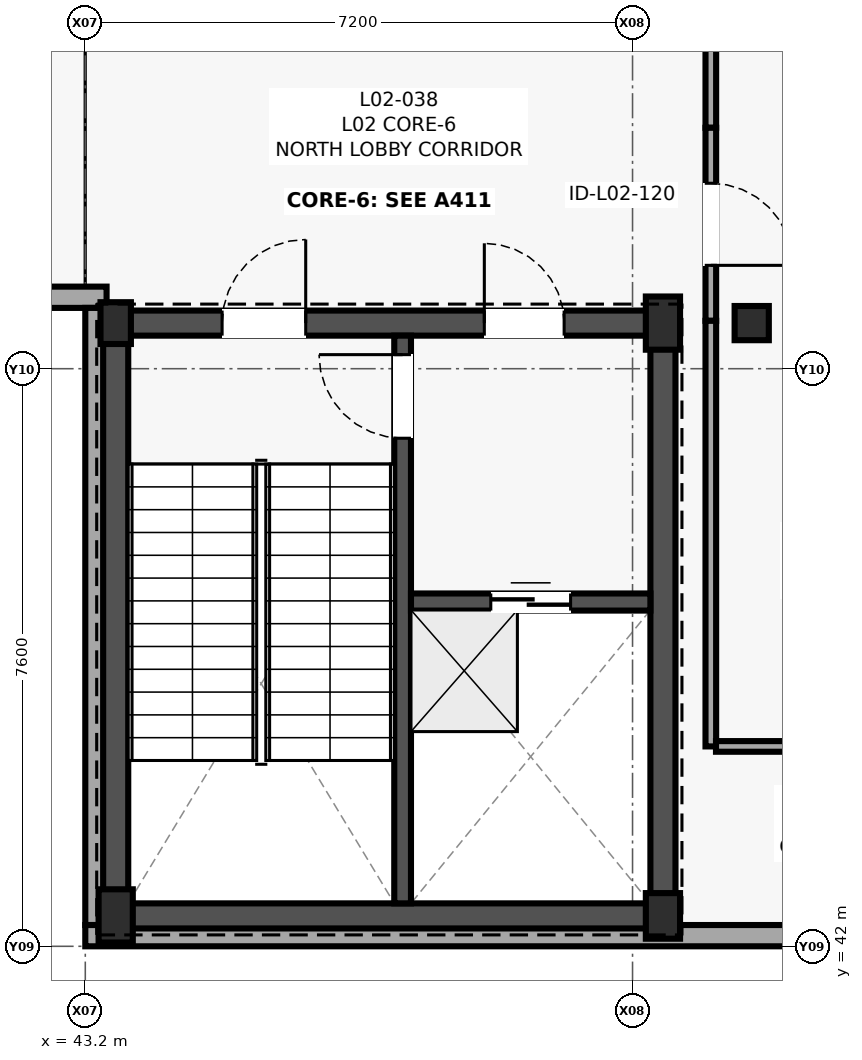
"""IFC4 building model, lengths in metres.
Left out: names, types, materials, properties, quantities, classifications, styles, units other than length and angle.
Written with IfcOpenShell. Run it as: python <this file> out.ifc"""

import sys

from ifc_helpers import new_model, si_unit, direction, frame, frame_2d, origin, origin_2d, place, context, subcontext, project, spatial, rectangle, circle, extrude, element, fill, save


model = new_model("IFC4")
c1 = context("Model", 3, precision=1e-05, world=origin(), true_north=direction((0.0, 1.0)))
c2 = subcontext(c1, "Body", "Model", "MODEL_VIEW")
j1 = project(units=[si_unit("LENGTHUNIT", "METRE"), si_unit("PLANEANGLEUNIT", "RADIAN")], contexts=[c1])
p1 = place(None, origin())
s1 = spatial("IfcSite", under=j1, at=p1, CompositionType="ELEMENT")
p2 = place(p1, origin())
s2 = spatial("IfcBuilding", under=s1, at=p2, CompositionType="ELEMENT")
p3 = place(p2, frame((0.0, 0.0, 8.2)))
s3 = spatial("IfcBuildingStorey", under=s2, at=p3, CompositionType="ELEMENT", Elevation=8.2)
p4 = place(p3, frame((43.6, 42.4, 0.0), z_axis=(0.0, 0.0, 1.0), x_axis=(1.0, 0.0, 0.0)))
e1 = element("IfcColumn", 1, at=p4, inside=s3, PredefinedType="COLUMN", context=c2, shape_type="SweptSolid", body=[
    extrude(rectangle(XDim=0.45, YDim=0.7, at=origin_2d()), origin(), (0.0, 0.0, 1.0), 4.0),
])
p5 = place(p3, frame((43.6, 50.2, 0.0), z_axis=(0.0, 0.0, 1.0), x_axis=(1.0, 0.0, 0.0)))
e2 = element("IfcColumn", 2, at=p5, inside=s3, PredefinedType="COLUMN", context=c2, shape_type="SweptSolid", body=[
    extrude(rectangle(XDim=0.4, YDim=0.55, at=origin_2d()), origin(), (0.0, 0.0, 1.0), 4.0),
])
p6 = place(p3, frame((50.8, 42.4, 0.0), z_axis=(0.0, 0.0, 1.0), x_axis=(1.0, 0.0, 0.0)))
e3 = element("IfcColumn", 3, at=p6, inside=s3, PredefinedType="COLUMN", context=c2, shape_type="SweptSolid", body=[
    extrude(rectangle(XDim=0.45, YDim=0.6, at=origin_2d()), origin(), (0.0, 0.0, 1.0), 4.0),
])
p7 = place(p3, frame((50.8, 50.2, 0.0), z_axis=(0.0, 0.0, 1.0), x_axis=(1.0, 0.0, 0.0)))
e4 = element("IfcColumn", 4, at=p7, inside=s3, PredefinedType="COLUMN", context=c2, shape_type="SweptSolid", body=[
    extrude(rectangle(XDim=0.45, YDim=0.7, at=origin_2d()), origin(), (0.0, 0.0, 1.0), 4.0),
])
p8 = place(p3, frame((51.968, 50.2, 0.0), z_axis=(0.0, 0.0, 1.0), x_axis=(1.0, 0.0, 0.0)))
e5 = element("IfcColumn", 5, at=p8, inside=s3, PredefinedType="COLUMN", context=c2, shape_type="SweptSolid", body=[
    extrude(circle(Radius=0.225, at=origin_2d()), origin(), (0.0, 0.0, 1.0), 4.0),
])
p9 = place(p3, frame((35.6, 50.54, 0.0), z_axis=(0.0, 0.0, 1.0), x_axis=(1.0, 0.0, 0.0)))
e6 = element("IfcWall", 6, at=p9, inside=s3, PredefinedType="SOLIDWALL", context=c2, shape_type="SweptSolid", body=[
    extrude(rectangle(XDim=7.88, YDim=0.28, at=frame_2d((3.94, 0.0))), origin(), (0.0, 0.0, 1.0), 3.78),
])
p10 = place(p9, frame((0.945, 0.0, 1.05)))
e7 = element("IfcOpeningElement", 7, at=p10, cuts=e6, PredefinedType="OPENING", context=c2, shape_type="SweptSolid", body=[
    extrude(rectangle(XDim=2.05, YDim=1.55, at=frame_2d((1.025, 0.775))), frame((0.0, 0.15, 0.0), z_axis=(0.0, -1.0, 0.0), x_axis=(1.0, 0.0, 0.0)), (0.0, 0.0, 1.0), 0.3),
])
p11 = place(p9, frame((4.76, 0.0, 1.05)))
e8 = element("IfcOpeningElement", 8, at=p11, cuts=e6, PredefinedType="OPENING", context=c2, shape_type="SweptSolid", body=[
    extrude(rectangle(XDim=2.3, YDim=1.45, at=frame_2d((1.15, 0.725))), frame((0.0, 0.15, 0.0), z_axis=(0.0, -1.0, 0.0), x_axis=(1.0, 0.0, 0.0)), (0.0, 0.0, 1.0), 0.3),
])
p12 = place(p3, frame((43.34, 50.4, 0.0), z_axis=(0.0, 0.0, 1.0), x_axis=(0.0, -1.0, 0.0)))
e9 = element("IfcWall", 9, at=p12, inside=s3, PredefinedType="SOLIDWALL", context=c2, shape_type="SweptSolid", body=[
    extrude(rectangle(XDim=8.12, YDim=0.28, at=frame_2d((4.06, 0.0))), origin(), (0.0, 0.0, 1.0), 3.78),
])
p13 = place(p3, frame((43.2, 42.14, 0.0), z_axis=(0.0, 0.0, 1.0), x_axis=(1.0, 0.0, 0.0)))
e10 = element("IfcWall", 10, at=p13, inside=s3, PredefinedType="SOLIDWALL", context=c2, shape_type="SweptSolid", body=[
    extrude(rectangle(XDim=12.093, YDim=0.28, at=frame_2d((6.046, 0.0))), origin(), (0.0, 0.0, 1.0), 3.78),
])
p14 = place(p13, frame((9.477, 0.0, 1.05)))
e11 = element("IfcOpeningElement", 11, at=p14, cuts=e10, PredefinedType="OPENING", context=c2, shape_type="SweptSolid", body=[
    extrude(rectangle(XDim=1.2, YDim=0.9, at=frame_2d((0.6, 0.45))), frame((0.0, 0.15, 0.0), z_axis=(0.0, -1.0, 0.0), x_axis=(1.0, 0.0, 0.0)), (0.0, 0.0, 1.0), 0.3),
])
p15 = place(p3, frame((43.435, 42.4, 0.0), z_axis=(0.0, 0.0, 1.0), x_axis=(1.0, 0.0, 0.0)))
e12 = element("IfcWall", 12, at=p15, inside=s3, PredefinedType="SHEAR", context=c2, shape_type="SweptSolid", body=[
    extrude(rectangle(XDim=7.53, YDim=0.33, at=frame_2d((3.765, 0.0))), origin(), (0.0, 0.0, 1.0), 3.78),
])
p16 = place(p3, frame((43.435, 50.2, 0.0), z_axis=(0.0, 0.0, 1.0), x_axis=(1.0, 0.0, 0.0)))
e13 = element("IfcWall", 13, at=p16, inside=s3, PredefinedType="SHEAR", context=c2, shape_type="SweptSolid", body=[
    extrude(rectangle(XDim=7.53, YDim=0.33, at=frame_2d((3.765, 0.0))), origin(), (0.0, 0.0, 1.0), 3.78),
])
p17 = place(p16, frame((5.015, 0.0, 0.0)))
e14 = element("IfcOpeningElement", 14, at=p17, cuts=e13, PredefinedType="OPENING", context=c2, shape_type="SweptSolid", body=[
    extrude(rectangle(XDim=1.05, YDim=2.15, at=frame_2d((0.525, 1.075))), frame((0.0, 0.175, 0.0), z_axis=(0.0, -1.0, 0.0), x_axis=(1.0, 0.0, 0.0)), (0.0, 0.0, 1.0), 0.35),
])
p18 = place(p16, frame((1.565, 0.0, 0.0)))
e15 = element("IfcOpeningElement", 15, at=p18, cuts=e13, PredefinedType="OPENING", context=c2, shape_type="SweptSolid", body=[
    extrude(rectangle(XDim=1.1, YDim=2.15, at=frame_2d((0.55, 1.075))), frame((0.0, 0.175, 0.0), z_axis=(0.0, -1.0, 0.0), x_axis=(1.0, 0.0, 0.0)), (0.0, 0.0, 1.0), 0.35),
])
for number, where, z_axis, x_axis in (
    (16, (43.6, 42.565, 0.0), (0.0, 0.0, 1.0), (0.0, 1.0, 0.0)),
    (17, (50.8, 42.565, 0.0), (0.0, 0.0, 1.0), (0.0, 1.0, 0.0)),
):
    element("IfcWall", number, at=place(p3, frame(where, z_axis=z_axis, x_axis=x_axis)), inside=s3, PredefinedType="SHEAR", context=c2, shape_type="SweptSolid", body=[
        extrude(rectangle(XDim=7.47, YDim=0.33, at=frame_2d((3.735, 0.0))), origin(), (0.0, 0.0, 1.0), 3.78),
    ])
p19 = place(p3, frame((47.375, 42.565, 0.0), z_axis=(0.0, 0.0, 1.0), x_axis=(0.0, 1.0, 0.0)))
e18 = element("IfcWall", 18, at=p19, inside=s3, PredefinedType="SHEAR", context=c2, shape_type="SweptSolid", body=[
    extrude(rectangle(XDim=7.47, YDim=0.22, at=frame_2d((3.735, 0.0))), origin(), (0.0, 0.0, 1.0), 3.78),
])
p20 = place(p19, frame((6.12, 0.0, 0.0)))
e19 = element("IfcOpeningElement", 19, at=p20, cuts=e18, PredefinedType="OPENING", context=c2, shape_type="SweptSolid", body=[
    extrude(rectangle(XDim=1.1, YDim=2.15, at=frame_2d((0.55, 1.075))), frame((0.0, 0.12, 0.0), z_axis=(0.0, -1.0, 0.0), x_axis=(1.0, 0.0, 0.0)), (0.0, 0.0, 1.0), 0.24),
])
p21 = place(p3, frame((47.485, 46.53, 0.0), z_axis=(0.0, 0.0, 1.0), x_axis=(1.0, 0.0, 0.0)))
e20 = element("IfcWall", 20, at=p21, inside=s3, PredefinedType="SHEAR", context=c2, shape_type="SweptSolid", body=[
    extrude(rectangle(XDim=3.15, YDim=0.225, at=frame_2d((1.575, 0.0))), origin(), (0.0, 0.0, 1.0), 3.78),
])
p22 = place(p21, frame((1.05, 0.0, 0.0)))
e21 = element("IfcOpeningElement", 21, at=p22, cuts=e20, PredefinedType="OPENING", context=c2, shape_type="SweptSolid", body=[
    extrude(rectangle(XDim=1.05, YDim=2.2, at=frame_2d((0.525, 1.1))), frame((0.0, 0.123, 0.0), z_axis=(0.0, -1.0, 0.0), x_axis=(1.0, 0.0, 0.0)), (0.0, 0.0, 1.0), 0.245),
])
p23 = place(p3, frame((51.43, 56.77, 0.0), z_axis=(0.0, 0.0, 1.0), x_axis=(0.0, -1.0, 0.0)))
e22 = element("IfcWall", 22, at=p23, inside=s3, PredefinedType="PARTITIONING", context=c2, shape_type="SweptSolid", body=[
    extrude(rectangle(XDim=4.0, YDim=0.14, at=frame_2d((2.0, 0.0))), origin(), (0.0, 0.0, 1.0), 3.775),
])
p24 = place(p3, frame((51.43, 52.77, 0.0), z_axis=(0.0, 0.0, 1.0), x_axis=(0.0, -1.0, 0.0)))
e23 = element("IfcWall", 23, at=p24, inside=s3, PredefinedType="PARTITIONING", context=c2, shape_type="SweptSolid", body=[
    extrude(rectangle(XDim=2.54, YDim=0.14, at=frame_2d((1.27, 0.0))), origin(), (0.0, 0.0, 1.0), 3.775),
])
p25 = place(p24, frame((0.73, 0.0, 0.0)))
e24 = element("IfcOpeningElement", 24, at=p25, cuts=e23, PredefinedType="OPENING", context=c2, shape_type="SweptSolid", body=[
    extrude(rectangle(XDim=1.08, YDim=2.16, at=frame_2d((0.54, 1.08))), frame((0.0, 0.08, 0.0), z_axis=(0.0, -1.0, 0.0), x_axis=(1.0, 0.0, 0.0)), (0.0, 0.0, 1.0), 0.16),
])
p26 = place(p3, frame((51.43, 50.23, 0.0), z_axis=(0.0, 0.0, 1.0), x_axis=(0.0, -1.0, 0.0)))
e25 = element("IfcWall", 25, at=p26, inside=s3, PredefinedType="PARTITIONING", context=c2, shape_type="SweptSolid", body=[
    extrude(rectangle(XDim=5.6, YDim=0.14, at=frame_2d((2.8, 0.0))), origin(), (0.0, 0.0, 1.0), 3.775),
])
p27 = place(p3, frame((51.498, 44.63, 0.0), z_axis=(0.0, 0.0, 1.0), x_axis=(1.0, 0.0, 0.0)))
e26 = element("IfcWall", 26, at=p27, inside=s3, PredefinedType="PARTITIONING", context=c2, shape_type="SweptSolid", body=[
    extrude(rectangle(XDim=11.872, YDim=0.14, at=frame_2d((5.936, 0.0))), origin(), (0.0, 0.0, 1.0), 3.775),
])
p28 = place(p22, origin())
e27 = element("IfcDoor", 27, at=p28, inside=s3, OperationType="SLIDING_TO_LEFT", PredefinedType="DOOR", context=c2, shape_type="SweptSolid", body=[
    extrude(rectangle(XDim=1.05, YDim=2.2, at=frame_2d((0.525, 1.1))), frame((0.0, 0.025, 0.0), z_axis=(0.0, -1.0, 0.0), x_axis=(1.0, 0.0, 0.0)), (0.0, 0.0, 1.0), 0.05),
])
fill(e21, e27)
p29 = place(p20, origin())
e28 = element("IfcDoor", 28, at=p29, inside=s3, OperationType="SINGLE_SWING_RIGHT", PredefinedType="DOOR", context=c2, shape_type="SweptSolid", body=[
    extrude(rectangle(XDim=1.1, YDim=2.15, at=frame_2d((0.55, 1.075))), frame((0.0, 0.025, 0.0), z_axis=(0.0, -1.0, 0.0), x_axis=(1.0, 0.0, 0.0)), (0.0, 0.0, 1.0), 0.05),
])
fill(e19, e28)
p30 = place(p17, origin())
e29 = element("IfcDoor", 29, at=p30, inside=s3, OperationType="SINGLE_SWING_LEFT", PredefinedType="DOOR", context=c2, shape_type="SweptSolid", body=[
    extrude(rectangle(XDim=1.05, YDim=2.15, at=frame_2d((0.525, 1.075))), frame((0.0, 0.025, 0.0), z_axis=(0.0, -1.0, 0.0), x_axis=(1.0, 0.0, 0.0)), (0.0, 0.0, 1.0), 0.05),
])
fill(e14, e29)
p31 = place(p18, origin())
e30 = element("IfcDoor", 30, at=p31, inside=s3, OperationType="SINGLE_SWING_RIGHT", PredefinedType="DOOR", context=c2, shape_type="SweptSolid", body=[
    extrude(rectangle(XDim=1.1, YDim=2.15, at=frame_2d((0.55, 1.075))), frame((0.0, 0.025, 0.0), z_axis=(0.0, -1.0, 0.0), x_axis=(1.0, 0.0, 0.0)), (0.0, 0.0, 1.0), 0.05),
])
fill(e15, e30)
p32 = place(p25, origin())
e31 = element("IfcDoor", 31, at=p32, inside=s3, OperationType="SINGLE_SWING_RIGHT", PredefinedType="DOOR", context=c2, shape_type="SweptSolid", body=[
    extrude(rectangle(XDim=1.08, YDim=2.16, at=frame_2d((0.54, 1.08))), frame((0.0, 0.025, 0.0), z_axis=(0.0, -1.0, 0.0), x_axis=(1.0, 0.0, 0.0)), (0.0, 0.0, 1.0), 0.05),
])
fill(e24, e31)
save(model, sys.argv[1])
